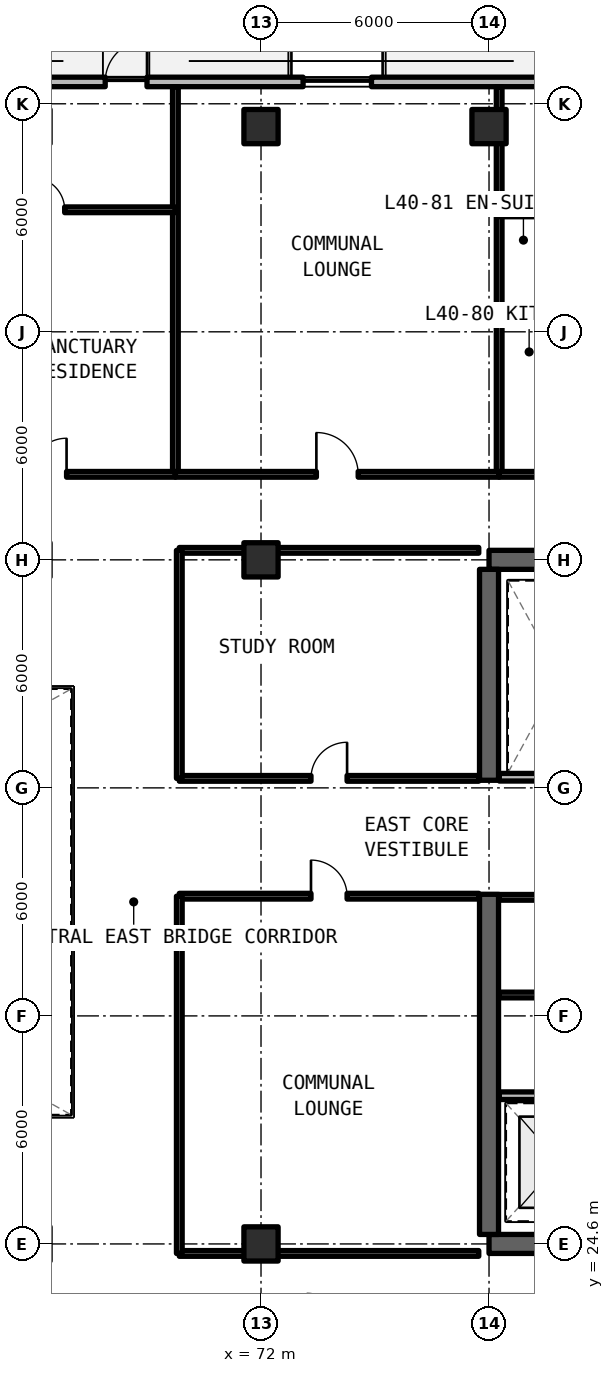
"""IFC4 building model, lengths in metres.
Left out: names, types, materials, properties, quantities, classifications, styles, units other than length and angle.
Written with IfcOpenShell. Run it as: python <this file> out.ifc"""

import sys

from ifc_helpers import new_model, si_unit, direction, frame, frame_2d, origin, origin_2d, place, context, subcontext, project, spatial, rectangle, extrude, element, fill, save


model = new_model("IFC4")
c1 = context("Model", 3, precision=1e-05, world=origin(), true_north=direction((0.0, 1.0)))
c2 = subcontext(c1, "Body", "Model", "MODEL_VIEW")
j1 = project(units=[si_unit("LENGTHUNIT", "METRE"), si_unit("PLANEANGLEUNIT", "RADIAN")], contexts=[c1])
p1 = place(None, origin())
s1 = spatial("IfcSite", under=j1, at=p1, CompositionType="ELEMENT")
p2 = place(p1, origin())
s2 = spatial("IfcBuilding", under=s1, at=p2, CompositionType="ELEMENT")
p3 = place(p2, frame((0.0, 0.0, 145.2)))
s3 = spatial("IfcBuildingStorey", under=s2, at=p3, CompositionType="ELEMENT", Elevation=145.2)
for number, where, z_axis, x_axis in (
    (1, (78.0, 24.6, 0.0), (0.0, 0.0, 1.0), (1.0, 0.0, 0.0)),
    (2, (90.0, 42.6, 0.0), (0.0, 0.0, 1.0), (-1.0, 0.0, 0.0)),
):
    element("IfcWall", number, at=place(p3, frame(where, z_axis=z_axis, x_axis=x_axis)), inside=s3, PredefinedType="SHEAR", context=c2, shape_type="SweptSolid", body=[
        extrude(rectangle(XDim=12.0, YDim=0.5, at=frame_2d((6.0, 0.0))), origin(), (0.0, 0.0, 1.0), 3.3),
    ])
p4 = place(p3, frame((78.0, 24.85, 0.0), z_axis=(0.0, 0.0, 1.0), x_axis=(0.0, 1.0, 0.0)))
e3 = element("IfcWall", 3, at=p4, inside=s3, PredefinedType="SHEAR", context=c2, shape_type="SweptSolid", body=[
    extrude(rectangle(XDim=8.95, YDim=0.5, at=frame_2d((4.475, 0.0))), origin(), (0.0, 0.0, 1.0), 3.3),
])
p5 = place(p3, frame((78.0, 36.8, 0.0), z_axis=(0.0, 0.0, 1.0), x_axis=(0.0, 1.0, 0.0)))
e4 = element("IfcWall", 4, at=p5, inside=s3, PredefinedType="SHEAR", context=c2, shape_type="SweptSolid", body=[
    extrude(rectangle(XDim=5.55, YDim=0.5, at=frame_2d((2.775, 0.0))), origin(), (0.0, 0.0, 1.0), 3.3),
])
for number, where, z_axis, x_axis in (
    (5, (72.0, 24.6, 0.0), (0.0, 0.0, 1.0), (1.0, 0.0, 0.0)),
    (6, (72.0, 42.6, 0.0), (0.0, 0.0, 1.0), (1.0, 0.0, 0.0)),
    (7, (72.0, 54.0, 0.0), (0.0, 0.0, 1.0), (1.0, 0.0, 0.0)),
    (8, (78.0, 54.0, 0.0), (0.0, 0.0, 1.0), (1.0, 0.0, 0.0)),
):
    element("IfcColumn", number, at=place(p3, frame(where, z_axis=z_axis, x_axis=x_axis)), inside=s3, PredefinedType="COLUMN", context=c2, shape_type="SweptSolid", body=[
        extrude(rectangle(XDim=0.9, YDim=0.9, at=origin_2d()), origin(), (0.0, 0.0, 1.0), 3.3),
    ])
p6 = place(p3, frame((95.748, 55.175, 0.0), z_axis=(0.0, 0.0, 1.0), x_axis=(-1.0, 0.0, 0.0)))
e9 = element("IfcWall", 9, at=p6, inside=s3, PredefinedType="SOLIDWALL", context=c2, shape_type="SweptSolid", body=[
    extrude(rectangle(XDim=43.623, YDim=0.25, at=frame_2d((21.812, 0.0))), origin(), (0.0, 0.0, 1.0), 3.08),
])
p7 = place(p6, frame((26.748, 0.0, 0.0)))
e10 = element("IfcOpeningElement", 10, at=p7, cuts=e9, PredefinedType="OPENING", context=c2, shape_type="SweptSolid", body=[
    extrude(rectangle(XDim=1.1, YDim=2.15, at=frame_2d((0.55, 1.075))), frame((0.0, 0.135, 0.0), z_axis=(0.0, -1.0, 0.0), x_axis=(1.0, 0.0, 0.0)), (0.0, 0.0, 1.0), 0.27),
])
p8 = place(p6, frame((14.898, 0.0, 0.0)))
e11 = element("IfcOpeningElement", 11, at=p8, cuts=e9, PredefinedType="OPENING", context=c2, shape_type="SweptSolid", body=[
    extrude(rectangle(XDim=1.1, YDim=2.15, at=frame_2d((0.55, 1.075))), frame((0.0, 0.135, 0.0), z_axis=(0.0, -1.0, 0.0), x_axis=(1.0, 0.0, 0.0)), (0.0, 0.0, 1.0), 0.27),
])
p9 = place(p6, frame((38.468, 0.0, 0.78)))
e12 = element("IfcOpeningElement", 12, at=p9, cuts=e9, PredefinedType="OPENING", context=c2, shape_type="SweptSolid", body=[
    extrude(rectangle(XDim=1.8, YDim=1.66, at=frame_2d((0.9, 0.83))), frame((0.0, 0.135, 0.0), z_axis=(0.0, -1.0, 0.0), x_axis=(1.0, 0.0, 0.0)), (0.0, 0.0, 1.0), 0.27),
])
p10 = place(p6, frame((20.841, 0.0, 0.78)))
e13 = element("IfcOpeningElement", 13, at=p10, cuts=e9, PredefinedType="OPENING", context=c2, shape_type="SweptSolid", body=[
    extrude(rectangle(XDim=1.8, YDim=1.66, at=frame_2d((0.9, 0.83))), frame((0.0, 0.135, 0.0), z_axis=(0.0, -1.0, 0.0), x_axis=(1.0, 0.0, 0.0)), (0.0, 0.0, 1.0), 0.27),
])
p11 = place(p6, frame((3.188, 0.0, 0.78)))
e14 = element("IfcOpeningElement", 14, at=p11, cuts=e9, PredefinedType="OPENING", context=c2, shape_type="SweptSolid", body=[
    extrude(rectangle(XDim=1.8, YDim=1.66, at=frame_2d((0.9, 0.83))), frame((0.0, 0.135, 0.0), z_axis=(0.0, -1.0, 0.0), x_axis=(1.0, 0.0, 0.0)), (0.0, 0.0, 1.0), 0.27),
])
p12 = place(p3, frame((78.27, 28.5, 0.0), z_axis=(0.0, 0.0, 1.0), x_axis=(1.0, 0.0, 0.0)))
e15 = element("IfcWall", 15, at=p12, inside=s3, PredefinedType="SOLIDWALL", context=c2, shape_type="SweptSolid", body=[
    extrude(rectangle(XDim=7.51, YDim=0.2, at=frame_2d((3.755, 0.0))), origin(), (0.0, 0.0, 1.0), 2.35),
])
p13 = place(p12, frame((3.53, 0.0, 0.0)))
e16 = element("IfcOpeningElement", 16, at=p13, cuts=e15, PredefinedType="OPENING", context=c2, shape_type="SweptSolid", body=[
    extrude(rectangle(XDim=1.0, YDim=2.15, at=frame_2d((0.5, 1.075))), frame((0.0, 0.11, 0.0), z_axis=(0.0, -1.0, 0.0), x_axis=(1.0, 0.0, 0.0)), (0.0, 0.0, 1.0), 0.22),
])
for number, where, z_axis, x_axis in (
    (17, (78.27, 31.15, 0.0), (0.0, 0.0, 1.0), (1.0, 0.0, 0.0)),
    (18, (78.27, 33.72, 0.0), (0.0, 0.0, 1.0), (1.0, 0.0, 0.0)),
):
    element("IfcWall", number, at=place(p3, frame(where, z_axis=z_axis, x_axis=x_axis)), inside=s3, PredefinedType="SOLIDWALL", context=c2, shape_type="SweptSolid", body=[
        extrude(rectangle(XDim=3.05, YDim=0.15, at=frame_2d((1.525, 0.0))), origin(), (0.0, 0.0, 1.0), 2.35),
    ])
p14 = place(p3, frame((78.27, 36.88, 0.0), z_axis=(0.0, 0.0, 1.0), x_axis=(1.0, 0.0, 0.0)))
e19 = element("IfcWall", 19, at=p14, inside=s3, PredefinedType="SOLIDWALL", context=c2, shape_type="SweptSolid", body=[
    extrude(rectangle(XDim=3.05, YDim=0.2, at=frame_2d((1.525, 0.0))), origin(), (0.0, 0.0, 1.0), 2.35),
])
p15 = place(p3, frame((69.85, 24.35, 0.0), z_axis=(0.0, 0.0, 1.0), x_axis=(1.0, 0.0, 0.0)))
e20 = element("IfcWall", 20, at=p15, inside=s3, PredefinedType="SOLIDWALL", context=c2, shape_type="SweptSolid", body=[
    extrude(rectangle(XDim=7.88, YDim=0.15, at=frame_2d((3.94, 0.0))), origin(), (0.0, 0.0, 1.0), 2.35),
])
p16 = place(p3, frame((69.85, 33.75, 0.0), z_axis=(0.0, 0.0, 1.0), x_axis=(1.0, 0.0, 0.0)))
e21 = element("IfcWall", 21, at=p16, inside=s3, PredefinedType="SOLIDWALL", context=c2, shape_type="SweptSolid", body=[
    extrude(rectangle(XDim=7.88, YDim=0.15, at=frame_2d((3.94, 0.0))), origin(), (0.0, 0.0, 1.0), 2.35),
])
p17 = place(p16, frame((3.465, 0.0, 0.0)))
e22 = element("IfcOpeningElement", 22, at=p17, cuts=e21, PredefinedType="OPENING", context=c2, shape_type="SweptSolid", body=[
    extrude(rectangle(XDim=0.95, YDim=2.15, at=frame_2d((0.475, 1.075))), frame((0.0, 0.085, 0.0), z_axis=(0.0, -1.0, 0.0), x_axis=(1.0, 0.0, 0.0)), (0.0, 0.0, 1.0), 0.17),
])
p18 = place(p3, frame((69.85, 24.35, 0.0), z_axis=(0.0, 0.0, 1.0), x_axis=(0.0, 1.0, 0.0)))
e23 = element("IfcWall", 23, at=p18, inside=s3, PredefinedType="SOLIDWALL", context=c2, shape_type="SweptSolid", body=[
    extrude(rectangle(XDim=9.4, YDim=0.15, at=frame_2d((4.7, 0.0))), origin(), (0.0, 0.0, 1.0), 2.35),
])
p19 = place(p3, frame((69.85, 36.85, 0.0), z_axis=(0.0, 0.0, 1.0), x_axis=(1.0, 0.0, 0.0)))
e24 = element("IfcWall", 24, at=p19, inside=s3, PredefinedType="SOLIDWALL", context=c2, shape_type="SweptSolid", body=[
    extrude(rectangle(XDim=7.88, YDim=0.15, at=frame_2d((3.94, 0.0))), origin(), (0.0, 0.0, 1.0), 2.35),
])
p20 = place(p19, frame((3.465, 0.0, 0.0)))
e25 = element("IfcOpeningElement", 25, at=p20, cuts=e24, PredefinedType="OPENING", context=c2, shape_type="SweptSolid", body=[
    extrude(rectangle(XDim=0.95, YDim=2.15, at=frame_2d((0.475, 1.075))), frame((0.0, 0.085, 0.0), z_axis=(0.0, -1.0, 0.0), x_axis=(1.0, 0.0, 0.0)), (0.0, 0.0, 1.0), 0.17),
])
p21 = place(p3, frame((69.85, 42.85, 0.0), z_axis=(0.0, 0.0, 1.0), x_axis=(1.0, 0.0, 0.0)))
e26 = element("IfcWall", 26, at=p21, inside=s3, PredefinedType="SOLIDWALL", context=c2, shape_type="SweptSolid", body=[
    extrude(rectangle(XDim=7.88, YDim=0.15, at=frame_2d((3.94, 0.0))), origin(), (0.0, 0.0, 1.0), 2.35),
])
p22 = place(p3, frame((69.85, 36.85, 0.0), z_axis=(0.0, 0.0, 1.0), x_axis=(0.0, 1.0, 0.0)))
e27 = element("IfcWall", 27, at=p22, inside=s3, PredefinedType="SOLIDWALL", context=c2, shape_type="SweptSolid", body=[
    extrude(rectangle(XDim=6.0, YDim=0.15, at=frame_2d((3.0, 0.0))), origin(), (0.0, 0.0, 1.0), 2.35),
])
p23 = place(p3, frame((69.747, 44.85, 0.0), z_axis=(0.0, 0.0, 1.0), x_axis=(0.0, 1.0, 0.0)))
e28 = element("IfcWall", 28, at=p23, inside=s3, PredefinedType="SOLIDWALL", context=c2, shape_type="SweptSolid", body=[
    extrude(rectangle(XDim=10.2, YDim=0.15, at=frame_2d((5.1, 0.0))), origin(), (0.0, 0.0, 1.0), 2.35),
])
p24 = place(p3, frame((60.64, 51.811, 0.0), z_axis=(0.0, 0.0, 1.0), x_axis=(1.0, 0.0, 0.0)))
e29 = element("IfcWall", 29, at=p24, inside=s3, PredefinedType="PARTITIONING", context=c2, shape_type="SweptSolid", body=[
    extrude(rectangle(XDim=9.107, YDim=0.15, at=frame_2d((4.554, 0.0))), origin(), (0.0, 0.0, 1.0), 2.35),
])
p25 = place(p24, frame((5.344, 0.0, 0.0)))
e30 = element("IfcOpeningElement", 30, at=p25, cuts=e29, PredefinedType="OPENING", context=c2, shape_type="SweptSolid", body=[
    extrude(rectangle(XDim=0.85, YDim=2.1, at=frame_2d((0.425, 1.05))), frame((0.0, 0.085, 0.0), z_axis=(0.0, -1.0, 0.0), x_axis=(1.0, 0.0, 0.0)), (0.0, 0.0, 1.0), 0.17),
])
p26 = place(p3, frame((60.64, 44.85, 0.0), z_axis=(0.0, 0.0, 1.0), x_axis=(1.0, 0.0, 0.0)))
e31 = element("IfcWall", 31, at=p26, inside=s3, PredefinedType="SOLIDWALL", context=c2, shape_type="SweptSolid", body=[
    extrude(rectangle(XDim=9.107, YDim=0.15, at=frame_2d((4.554, 0.0))), origin(), (0.0, 0.0, 1.0), 2.35),
])
p27 = place(p26, frame((5.294, 0.0, 0.0)))
e32 = element("IfcOpeningElement", 32, at=p27, cuts=e31, PredefinedType="OPENING", context=c2, shape_type="SweptSolid", body=[
    extrude(rectangle(XDim=0.95, YDim=2.15, at=frame_2d((0.475, 1.075))), frame((0.0, 0.085, 0.0), z_axis=(0.0, -1.0, 0.0), x_axis=(1.0, 0.0, 0.0)), (0.0, 0.0, 1.0), 0.17),
])
p28 = place(p3, frame((78.267, 44.85, 0.0), z_axis=(0.0, 0.0, 1.0), x_axis=(0.0, 1.0, 0.0)))
e33 = element("IfcWall", 33, at=p28, inside=s3, PredefinedType="SOLIDWALL", context=c2, shape_type="SweptSolid", body=[
    extrude(rectangle(XDim=10.2, YDim=0.15, at=frame_2d((5.1, 0.0))), origin(), (0.0, 0.0, 1.0), 2.35),
])
p29 = place(p3, frame((69.747, 44.85, 0.0), z_axis=(0.0, 0.0, 1.0), x_axis=(1.0, 0.0, 0.0)))
e34 = element("IfcWall", 34, at=p29, inside=s3, PredefinedType="SOLIDWALL", context=c2, shape_type="SweptSolid", body=[
    extrude(rectangle(XDim=8.52, YDim=0.15, at=frame_2d((4.26, 0.0))), origin(), (0.0, 0.0, 1.0), 2.35),
])
p30 = place(p29, frame((3.71, 0.0, 0.0)))
e35 = element("IfcOpeningElement", 35, at=p30, cuts=e34, PredefinedType="OPENING", context=c2, shape_type="SweptSolid", body=[
    extrude(rectangle(XDim=1.1, YDim=2.15, at=frame_2d((0.55, 1.075))), frame((0.0, 0.085, 0.0), z_axis=(0.0, -1.0, 0.0), x_axis=(1.0, 0.0, 0.0)), (0.0, 0.0, 1.0), 0.17),
])
p31 = place(p3, frame((78.267, 48.893, 0.0), z_axis=(0.0, 0.0, 1.0), x_axis=(1.0, 0.0, 0.0)))
e36 = element("IfcWall", 36, at=p31, inside=s3, PredefinedType="PARTITIONING", context=c2, shape_type="SweptSolid", body=[
    extrude(rectangle(XDim=2.35, YDim=0.15, at=frame_2d((1.175, 0.0))), origin(), (0.0, 0.0, 1.0), 2.35),
])
p32 = place(p3, frame((78.267, 51.703, 0.0), z_axis=(0.0, 0.0, 1.0), x_axis=(1.0, 0.0, 0.0)))
e37 = element("IfcWall", 37, at=p32, inside=s3, PredefinedType="PARTITIONING", context=c2, shape_type="SweptSolid", body=[
    extrude(rectangle(XDim=8.813, YDim=0.15, at=frame_2d((4.407, 0.0))), origin(), (0.0, 0.0, 1.0), 2.35),
])
p33 = place(p32, frame((5.197, 0.0, 0.0)))
e38 = element("IfcOpeningElement", 38, at=p33, cuts=e37, PredefinedType="OPENING", context=c2, shape_type="SweptSolid", body=[
    extrude(rectangle(XDim=0.85, YDim=2.1, at=frame_2d((0.425, 1.05))), frame((0.0, 0.085, 0.0), z_axis=(0.0, -1.0, 0.0), x_axis=(1.0, 0.0, 0.0)), (0.0, 0.0, 1.0), 0.17),
])
p34 = place(p3, frame((78.267, 44.85, 0.0), z_axis=(0.0, 0.0, 1.0), x_axis=(1.0, 0.0, 0.0)))
e39 = element("IfcWall", 39, at=p34, inside=s3, PredefinedType="SOLIDWALL", context=c2, shape_type="SweptSolid", body=[
    extrude(rectangle(XDim=8.813, YDim=0.15, at=frame_2d((4.407, 0.0))), origin(), (0.0, 0.0, 1.0), 2.35),
])
p35 = place(p34, frame((5.147, 0.0, 0.0)))
e40 = element("IfcOpeningElement", 40, at=p35, cuts=e39, PredefinedType="OPENING", context=c2, shape_type="SweptSolid", body=[
    extrude(rectangle(XDim=0.95, YDim=2.15, at=frame_2d((0.475, 1.075))), frame((0.0, 0.085, 0.0), z_axis=(0.0, -1.0, 0.0), x_axis=(1.0, 0.0, 0.0)), (0.0, 0.0, 1.0), 0.17),
])
p36 = place(p7, frame((1.1, 0.0, 0.0), z_axis=(0.0, 0.0, 1.0), x_axis=(-1.0, 0.0, 0.0)))
e41 = element("IfcDoor", 41, at=p36, inside=s3, OperationType="SINGLE_SWING_RIGHT", PredefinedType="DOOR", context=c2, shape_type="SweptSolid", body=[
    extrude(rectangle(XDim=1.1, YDim=2.15, at=frame_2d((0.55, 1.075))), frame((0.0, 0.025, 0.0), z_axis=(0.0, -1.0, 0.0), x_axis=(1.0, 0.0, 0.0)), (0.0, 0.0, 1.0), 0.05),
])
fill(e10, e41)
p37 = place(p10, origin())
e42 = element("IfcWindow", 42, at=p37, inside=s3, PartitioningType="SINGLE_PANEL", PredefinedType="WINDOW", context=c2, shape_type="SweptSolid", body=[
    extrude(rectangle(XDim=1.8, YDim=1.66, at=frame_2d((0.9, 0.83))), frame((0.0, 0.03, 0.0), z_axis=(0.0, -1.0, 0.0), x_axis=(1.0, 0.0, 0.0)), (0.0, 0.0, 1.0), 0.06),
])
fill(e13, e42)
p38 = place(p17, origin())
e43 = element("IfcDoor", 43, at=p38, inside=s3, OperationType="SINGLE_SWING_LEFT", PredefinedType="DOOR", context=c2, shape_type="SweptSolid", body=[
    extrude(rectangle(XDim=0.95, YDim=2.15, at=frame_2d((0.475, 1.075))), frame((0.0, 0.025, 0.0), z_axis=(0.0, -1.0, 0.0), x_axis=(1.0, 0.0, 0.0)), (0.0, 0.0, 1.0), 0.05),
])
fill(e22, e43)
p39 = place(p20, origin())
e44 = element("IfcDoor", 44, at=p39, inside=s3, OperationType="SINGLE_SWING_RIGHT", PredefinedType="DOOR", context=c2, shape_type="SweptSolid", body=[
    extrude(rectangle(XDim=0.95, YDim=2.15, at=frame_2d((0.475, 1.075))), frame((0.0, 0.025, 0.0), z_axis=(0.0, -1.0, 0.0), x_axis=(1.0, 0.0, 0.0)), (0.0, 0.0, 1.0), 0.05),
])
fill(e25, e44)
p40 = place(p25, origin())
e45 = element("IfcDoor", 45, at=p40, inside=s3, OperationType="SINGLE_SWING_LEFT", PredefinedType="DOOR", context=c2, shape_type="SweptSolid", body=[
    extrude(rectangle(XDim=0.85, YDim=2.1, at=frame_2d((0.425, 1.05))), frame((0.0, 0.025, 0.0), z_axis=(0.0, -1.0, 0.0), x_axis=(1.0, 0.0, 0.0)), (0.0, 0.0, 1.0), 0.05),
])
fill(e30, e45)
p41 = place(p27, origin())
e46 = element("IfcDoor", 46, at=p41, inside=s3, OperationType="SINGLE_SWING_RIGHT", PredefinedType="DOOR", context=c2, shape_type="SweptSolid", body=[
    extrude(rectangle(XDim=0.95, YDim=2.15, at=frame_2d((0.475, 1.075))), frame((0.0, 0.025, 0.0), z_axis=(0.0, -1.0, 0.0), x_axis=(1.0, 0.0, 0.0)), (0.0, 0.0, 1.0), 0.05),
])
fill(e32, e46)
p42 = place(p30, origin())
e47 = element("IfcDoor", 47, at=p42, inside=s3, OperationType="SINGLE_SWING_LEFT", PredefinedType="DOOR", context=c2, shape_type="SweptSolid", body=[
    extrude(rectangle(XDim=1.1, YDim=2.15, at=frame_2d((0.55, 1.075))), frame((0.0, 0.025, 0.0), z_axis=(0.0, -1.0, 0.0), x_axis=(1.0, 0.0, 0.0)), (0.0, 0.0, 1.0), 0.05),
])
fill(e35, e47)
save(model, sys.argv[1])
